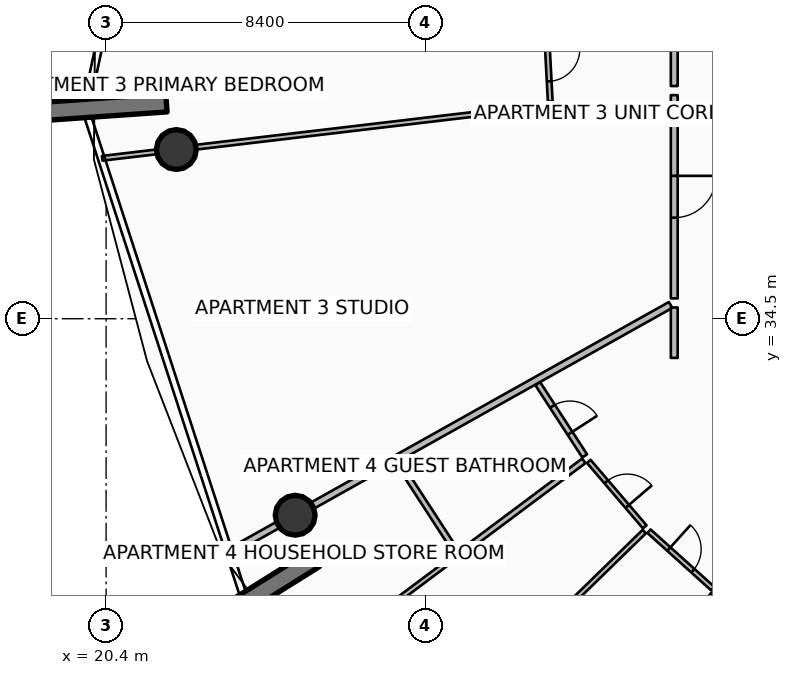
"""IFC4 building model, lengths in metres.
Left out: names, types, materials, properties, quantities, classifications, styles, units other than length and angle.
Written with IfcOpenShell. Run it as: python <this file> out.ifc"""

import sys

from ifc_helpers import new_model, si_unit, direction, frame, frame_2d, origin, origin_2d, place, context, subcontext, project, spatial, rectangle, circle, extrude, element, fill, save


model = new_model("IFC4")
c1 = context("Model", 3, precision=1e-05, world=origin(), true_north=direction((0.0, 1.0)))
c2 = subcontext(c1, "Body", "Model", "MODEL_VIEW")
j1 = project(units=[si_unit("LENGTHUNIT", "METRE"), si_unit("PLANEANGLEUNIT", "RADIAN")], contexts=[c1])
p1 = place(None, origin())
s1 = spatial("IfcSite", under=j1, at=p1, CompositionType="ELEMENT")
p2 = place(p1, origin())
s2 = spatial("IfcBuilding", under=s1, at=p2, CompositionType="ELEMENT")
p3 = place(p2, frame((0.0, 0.0, 202.8)))
s3 = spatial("IfcBuildingStorey", under=s2, at=p3, CompositionType="ELEMENT", Elevation=202.8)
p4 = place(p3, frame((21.987, 40.181, 0.0), z_axis=(0.0, 0.0, 1.0), x_axis=(-0.997568676264, -0.069690287244, 0.0)))
e1 = element("IfcWall", 1, at=p4, inside=s3, PredefinedType="SOLIDWALL", context=c2, shape_type="SweptSolid", body=[
    extrude(rectangle(XDim=3.5, YDim=0.48, at=frame_2d((1.75, 0.0))), origin(), (0.0, 0.0, 1.0), 3.75),
])
p5 = place(p3, frame((25.886, 28.182, 0.0), z_axis=(0.0, 0.0, 1.0), x_axis=(-0.848033572426, -0.529942506352, 0.0)))
e2 = element("IfcWall", 2, at=p5, inside=s3, PredefinedType="SOLIDWALL", context=c2, shape_type="SweptSolid", body=[
    extrude(rectangle(XDim=3.5, YDim=0.48, at=frame_2d((1.75, 0.0))), origin(), (0.0, 0.0, 1.0), 3.75),
])
for number, where, z_axis, x_axis in (
    (3, (22.248, 38.952, 0.0), (0.0, 0.0, 1.0), (1.0, 0.0, 0.0)),
    (4, (25.375, 29.329, 0.0), (0.0, 0.0, 1.0), (1.0, 0.0, 0.0)),
):
    element("IfcColumn", number, at=place(p3, frame(where, z_axis=z_axis, x_axis=x_axis)), inside=s3, PredefinedType="COLUMN", context=c2, shape_type="SweptSolid", body=[
        extrude(circle(Radius=0.525, at=origin_2d()), origin(), (0.0, 0.0, 1.0), 3.5),
    ])
p6 = place(p3, frame((35.254, 34.862, 0.0), z_axis=(0.0, 0.0, 1.0), x_axis=(-0.872489721771, -0.488632464541, 0.0)))
e5 = element("IfcWall", 5, at=p6, inside=s3, PredefinedType="PARTITIONING", context=c2, shape_type="SweptSolid", body=[
    extrude(rectangle(XDim=13.286, YDim=0.18, at=frame_2d((6.643, 0.0))), origin(), (0.0, 0.0, 1.0), 2.94),
])
p7 = place(p3, frame((35.35, 40.383, 0.0), z_axis=(0.0, 0.0, 1.0), x_axis=(0.0, -1.0, 0.0)))
e6 = element("IfcWall", 6, at=p7, inside=s3, PredefinedType="PARTITIONING", context=c2, shape_type="SweptSolid", body=[
    extrude(rectangle(XDim=5.347, YDim=0.18, at=frame_2d((2.674, 0.0))), origin(), (0.0, 0.0, 1.0), 2.94),
])
p8 = place(p7, frame((2.124, 0.0, 0.0)))
e7 = element("IfcOpeningElement", 7, at=p8, cuts=e6, PredefinedType="OPENING", context=c2, shape_type="SweptSolid", body=[
    extrude(rectangle(XDim=1.1, YDim=2.1, at=frame_2d((0.55, 1.05))), frame((0.0, 0.1, 0.0), z_axis=(0.0, -1.0, 0.0), x_axis=(1.0, 0.0, 0.0)), (0.0, 0.0, 1.0), 0.2),
])
p9 = place(p3, frame((35.35, 45.448, 0.0), z_axis=(0.0, 0.0, 1.0), x_axis=(0.0, -1.0, 0.0)))
e8 = element("IfcWall", 8, at=p9, inside=s3, PredefinedType="PARTITIONING", context=c2, shape_type="SweptSolid", body=[
    extrude(rectangle(XDim=4.825, YDim=0.18, at=frame_2d((2.413, 0.0))), origin(), (0.0, 0.0, 1.0), 2.94),
])
p10 = place(p3, frame((31.993, 40.105, 0.0), z_axis=(0.0, 0.0, 1.0), x_axis=(-0.993067142816, -0.117548500026, 0.0)))
e9 = element("IfcWall", 9, at=p10, inside=s3, PredefinedType="PARTITIONING", context=c2, shape_type="SweptSolid", body=[
    extrude(rectangle(XDim=11.776, YDim=0.125, at=frame_2d((5.888, 0.0))), origin(), (0.0, 0.0, 1.0), 2.94),
])
p11 = place(p3, frame((31.987, 42.125, 0.0), z_axis=(0.0, 0.0, 1.0), x_axis=(0.052531998998, -0.998619241293, 0.0)))
e10 = element("IfcWall", 10, at=p11, inside=s3, PredefinedType="PARTITIONING", context=c2, shape_type="SweptSolid", body=[
    extrude(rectangle(XDim=1.91, YDim=0.125, at=frame_2d((0.955, 0.0))), origin(), (0.0, 0.0, 1.0), 2.94),
])
p12 = place(p11, frame((0.53, 0.0, 0.0)))
e11 = element("IfcOpeningElement", 11, at=p12, cuts=e10, PredefinedType="OPENING", context=c2, shape_type="SweptSolid", body=[
    extrude(rectangle(XDim=0.85, YDim=2.06, at=frame_2d((0.425, 1.03))), frame((0.0, 0.073, 0.0), z_axis=(0.0, -1.0, 0.0), x_axis=(1.0, 0.0, 0.0)), (0.0, 0.0, 1.0), 0.145),
])
p13 = place(p3, frame((35.35, 34.796, 0.0), z_axis=(0.0, 0.0, 1.0), x_axis=(0.0, -1.0, 0.0)))
e12 = element("IfcWall", 12, at=p13, inside=s3, PredefinedType="PARTITIONING", context=c2, shape_type="SweptSolid", body=[
    extrude(rectangle(XDim=1.326, YDim=0.18, at=frame_2d((0.663, 0.0))), origin(), (0.0, 0.0, 1.0), 2.94),
])
p14 = place(p3, frame((31.759, 32.79, 0.0), z_axis=(0.0, 0.0, 1.0), x_axis=(0.544988350595, -0.838443616301, 0.0)))
e13 = element("IfcWall", 13, at=p14, inside=s3, PredefinedType="PARTITIONING", context=c2, shape_type="SweptSolid", body=[
    extrude(rectangle(XDim=2.265, YDim=0.15, at=frame_2d((1.133, 0.0))), origin(), (0.0, 0.0, 1.0), 2.94),
])
p15 = place(p14, frame((0.708, 0.0, 0.0)))
e14 = element("IfcOpeningElement", 14, at=p15, cuts=e13, PredefinedType="OPENING", context=c2, shape_type="SweptSolid", body=[
    extrude(rectangle(XDim=0.85, YDim=2.06, at=frame_2d((0.425, 1.03))), frame((0.0, 0.085, 0.0), z_axis=(0.0, -1.0, 0.0), x_axis=(1.0, 0.0, 0.0)), (0.0, 0.0, 1.0), 0.17),
])
p16 = place(p3, frame((28.077, 30.728, 0.0), z_axis=(0.0, 0.0, 1.0), x_axis=(0.544973135676, -0.838453505802, 0.0)))
e15 = element("IfcWall", 15, at=p16, inside=s3, PredefinedType="PARTITIONING", context=c2, shape_type="SweptSolid", body=[
    extrude(rectangle(XDim=2.82, YDim=0.15, at=frame_2d((1.41, 0.0))), origin(), (0.0, 0.0, 1.0), 2.94),
])
p17 = place(p3, frame((32.97, 30.761, 0.0), z_axis=(0.0, 0.0, 1.0), x_axis=(-0.800880183309, -0.598824625398, 0.0)))
e16 = element("IfcWall", 16, at=p17, inside=s3, PredefinedType="PARTITIONING", context=c2, shape_type="SweptSolid", body=[
    extrude(rectangle(XDim=4.09, YDim=0.15, at=frame_2d((2.045, 0.0))), origin(), (0.0, 0.0, 1.0), 2.94),
])
p18 = place(p3, frame((29.591, 28.234, 0.0), z_axis=(0.0, 0.0, 1.0), x_axis=(-0.80085424852, -0.598859309544, 0.0)))
e17 = element("IfcWall", 17, at=p18, inside=s3, PredefinedType="PARTITIONING", context=c2, shape_type="SweptSolid", body=[
    extrude(rectangle(XDim=4.625, YDim=0.125, at=frame_2d((2.313, 0.0))), origin(), (0.0, 0.0, 1.0), 2.94),
])
p19 = place(p18, frame((1.888, 0.0, 0.0)))
e18 = element("IfcOpeningElement", 18, at=p19, cuts=e17, PredefinedType="OPENING", context=c2, shape_type="SweptSolid", body=[
    extrude(rectangle(XDim=0.85, YDim=2.06, at=frame_2d((0.425, 1.03))), frame((0.0, 0.073, 0.0), z_axis=(0.0, -1.0, 0.0), x_axis=(1.0, 0.0, 0.0)), (0.0, 0.0, 1.0), 0.145),
])
p20 = place(p3, frame((34.562, 28.9, 0.0), z_axis=(0.0, 0.0, 1.0), x_axis=(-0.716077779963, -0.698020496148, 0.0)))
e19 = element("IfcWall", 19, at=p20, inside=s3, PredefinedType="PARTITIONING", context=c2, shape_type="SweptSolid", body=[
    extrude(rectangle(XDim=8.369, YDim=0.125, at=frame_2d((4.185, 0.0))), origin(), (0.0, 0.0, 1.0), 2.94),
])
p21 = place(p3, frame((33.101, 30.747, 0.0), z_axis=(0.0, 0.0, 1.0), x_axis=(0.649815270802, -0.760092174564, 0.0)))
e20 = element("IfcWall", 20, at=p21, inside=s3, PredefinedType="PARTITIONING", context=c2, shape_type="SweptSolid", body=[
    extrude(rectangle(XDim=2.267, YDim=0.125, at=frame_2d((1.134, 0.0))), origin(), (0.0, 0.0, 1.0), 2.94),
])
p22 = place(p21, frame((0.708, 0.0, 0.0)))
e21 = element("IfcOpeningElement", 21, at=p22, cuts=e20, PredefinedType="OPENING", context=c2, shape_type="SweptSolid", body=[
    extrude(rectangle(XDim=0.85, YDim=2.06, at=frame_2d((0.425, 1.03))), frame((0.0, 0.073, 0.0), z_axis=(0.0, -1.0, 0.0), x_axis=(1.0, 0.0, 0.0)), (0.0, 0.0, 1.0), 0.145),
])
p23 = place(p3, frame((34.685, 28.909, 0.0), z_axis=(0.0, 0.0, 1.0), x_axis=(0.74323497862, -0.669030467584, 0.0)))
e22 = element("IfcWall", 22, at=p23, inside=s3, PredefinedType="PARTITIONING", context=c2, shape_type="SweptSolid", body=[
    extrude(rectangle(XDim=2.257, YDim=0.125, at=frame_2d((1.128, 0.0))), origin(), (0.0, 0.0, 1.0), 2.94),
])
p24 = place(p23, frame((0.704, 0.0, 0.0)))
e23 = element("IfcOpeningElement", 23, at=p24, cuts=e22, PredefinedType="OPENING", context=c2, shape_type="SweptSolid", body=[
    extrude(rectangle(XDim=0.85, YDim=2.06, at=frame_2d((0.425, 1.03))), frame((0.0, 0.073, 0.0), z_axis=(0.0, -1.0, 0.0), x_axis=(1.0, 0.0, 0.0)), (0.0, 0.0, 1.0), 0.145),
])
p25 = place(p3, frame((36.375, 27.254, 0.0), z_axis=(0.0, 0.0, 1.0), x_axis=(-0.619083134383, -0.785325456561, 0.0)))
e24 = element("IfcWall", 24, at=p25, inside=s3, PredefinedType="PARTITIONING", context=c2, shape_type="SweptSolid", body=[
    extrude(rectangle(XDim=8.353, YDim=0.125, at=frame_2d((4.177, 0.0))), origin(), (0.0, 0.0, 1.0), 2.94),
])
p26 = place(p8, origin())
e25 = element("IfcDoor", 25, at=p26, inside=s3, OperationType="SINGLE_SWING_LEFT", PredefinedType="DOOR", context=c2, shape_type="SweptSolid", body=[
    extrude(rectangle(XDim=1.1, YDim=2.1, at=frame_2d((0.55, 1.05))), frame((0.0, 0.025, 0.0), z_axis=(0.0, -1.0, 0.0), x_axis=(1.0, 0.0, 0.0)), (0.0, 0.0, 1.0), 0.05),
])
fill(e7, e25)
p27 = place(p12, origin())
e26 = element("IfcDoor", 26, at=p27, inside=s3, OperationType="SINGLE_SWING_LEFT", PredefinedType="DOOR", context=c2, shape_type="SweptSolid", body=[
    extrude(rectangle(XDim=0.85, YDim=2.06, at=frame_2d((0.425, 1.03))), frame((0.0, 0.025, 0.0), z_axis=(0.0, -1.0, 0.0), x_axis=(1.0, 0.0, 0.0)), (0.0, 0.0, 1.0), 0.05),
])
fill(e11, e26)
p28 = place(p15, origin())
e27 = element("IfcDoor", 27, at=p28, inside=s3, OperationType="SINGLE_SWING_RIGHT", PredefinedType="DOOR", context=c2, shape_type="SweptSolid", body=[
    extrude(rectangle(XDim=0.85, YDim=2.06, at=frame_2d((0.425, 1.03))), frame((0.0, 0.025, 0.0), z_axis=(0.0, -1.0, 0.0), x_axis=(1.0, 0.0, 0.0)), (0.0, 0.0, 1.0), 0.05),
])
fill(e14, e27)
p29 = place(p22, origin())
e28 = element("IfcDoor", 28, at=p29, inside=s3, OperationType="SINGLE_SWING_RIGHT", PredefinedType="DOOR", context=c2, shape_type="SweptSolid", body=[
    extrude(rectangle(XDim=0.85, YDim=2.06, at=frame_2d((0.425, 1.03))), frame((0.0, 0.025, 0.0), z_axis=(0.0, -1.0, 0.0), x_axis=(1.0, 0.0, 0.0)), (0.0, 0.0, 1.0), 0.05),
])
fill(e21, e28)
p30 = place(p24, origin())
e29 = element("IfcDoor", 29, at=p30, inside=s3, OperationType="SINGLE_SWING_LEFT", PredefinedType="DOOR", context=c2, shape_type="SweptSolid", body=[
    extrude(rectangle(XDim=0.85, YDim=2.06, at=frame_2d((0.425, 1.03))), frame((0.0, 0.025, 0.0), z_axis=(0.0, -1.0, 0.0), x_axis=(1.0, 0.0, 0.0)), (0.0, 0.0, 1.0), 0.05),
])
fill(e23, e29)
save(model, sys.argv[1])
